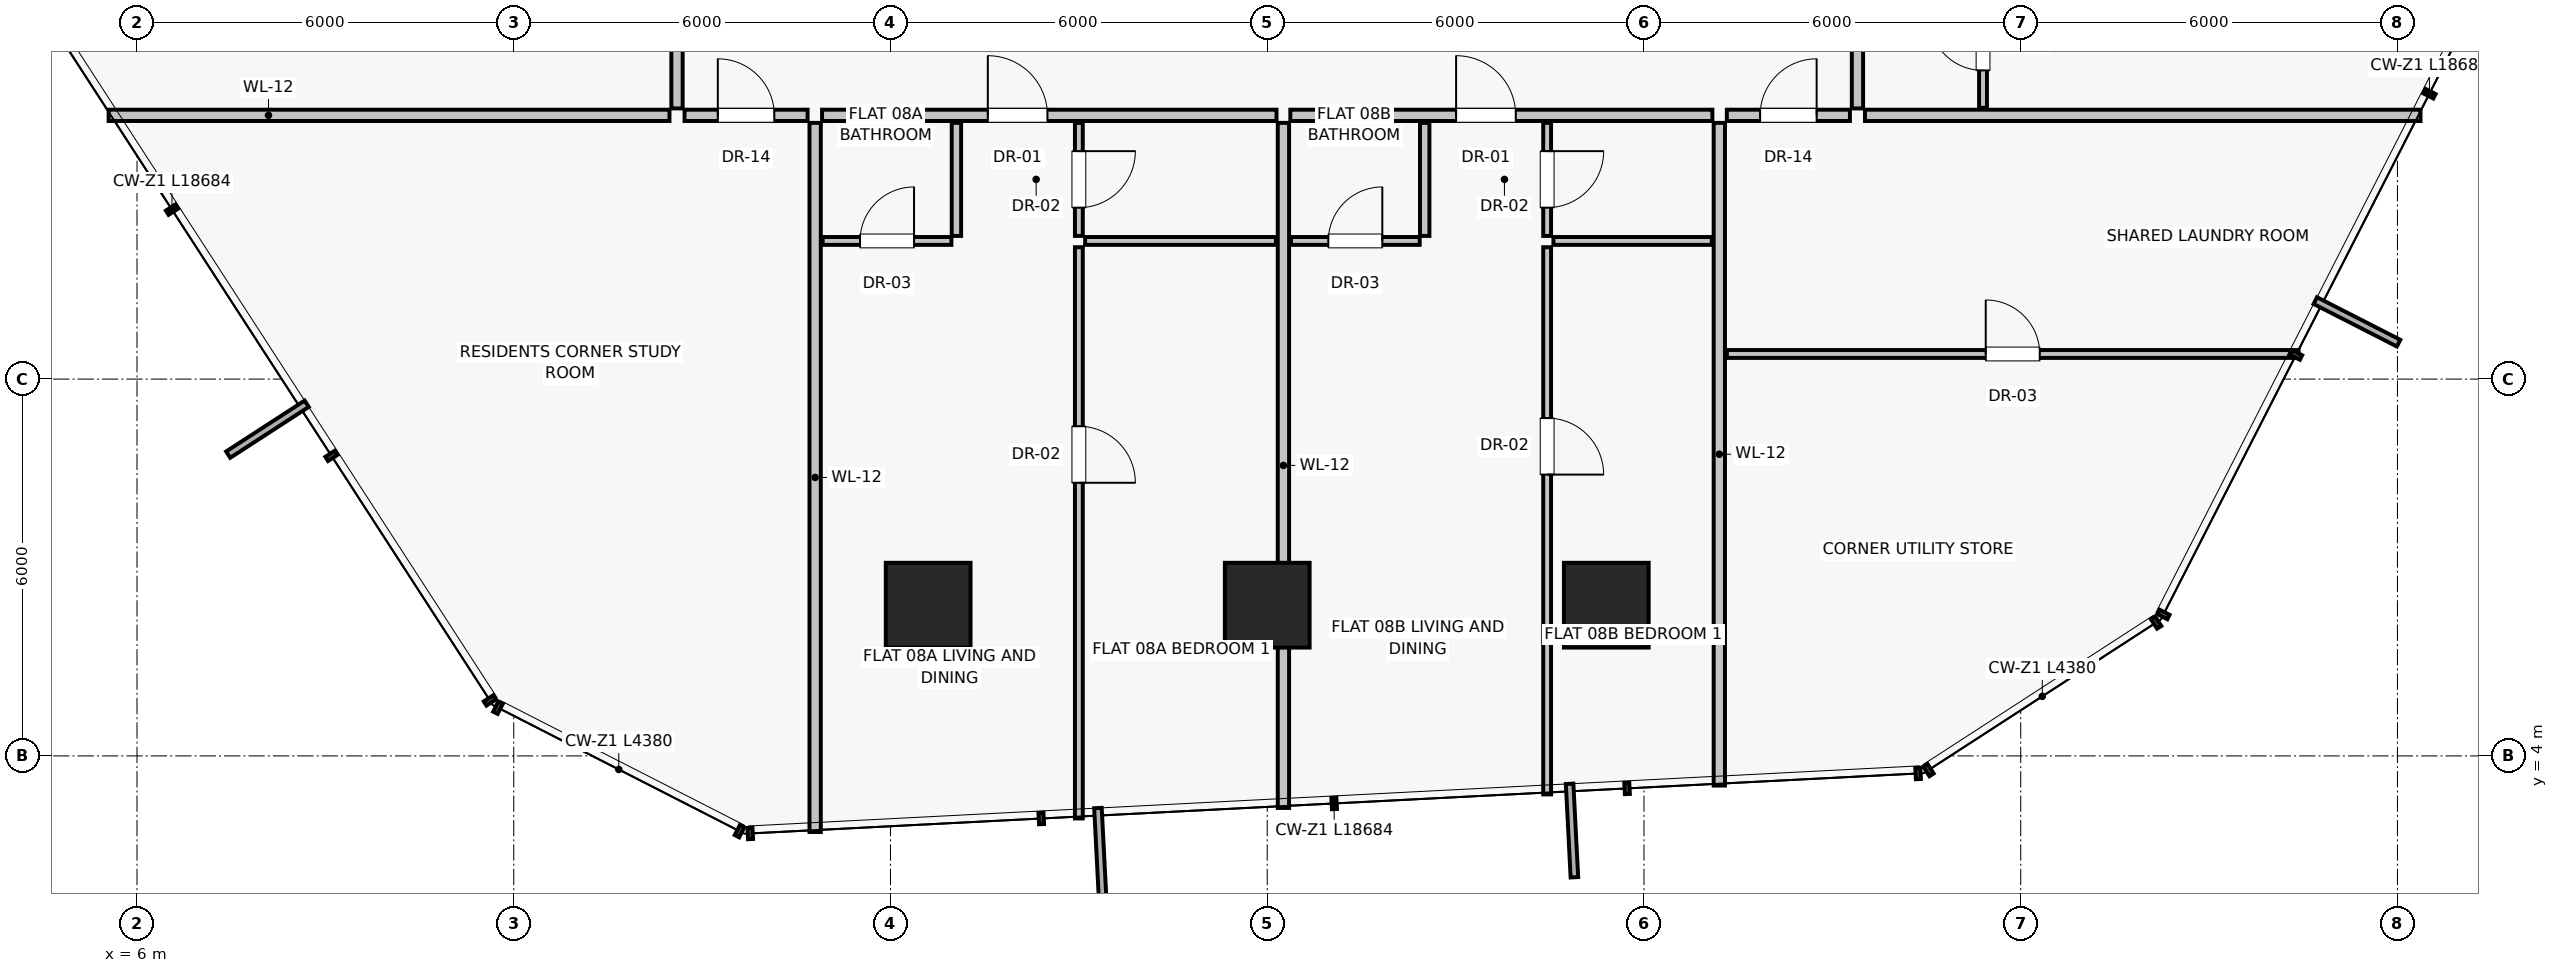
"""IFC4 building model, lengths in metres.
Left out: names, types, materials, properties, quantities, classifications, styles, units other than length and angle.
Written with IfcOpenShell. Run it as: python <this file> out.ifc"""

import sys

from ifc_helpers import new_model, si_unit, direction, frame, frame_2d, origin, origin_2d, place, context, subcontext, project, spatial, rectangle, extrude, source, transform, mapped, element, fill, save


model = new_model("IFC4")
c1 = context("Model", 3, precision=1e-05, world=origin(), true_north=direction((0.0, 1.0)))
c2 = subcontext(c1, "Body", "Model", "MODEL_VIEW")
j1 = project(units=[si_unit("LENGTHUNIT", "METRE"), si_unit("PLANEANGLEUNIT", "RADIAN")], contexts=[c1])
p1 = place(None, origin())
s1 = spatial("IfcSite", under=j1, at=p1, CompositionType="ELEMENT")
p2 = place(p1, origin())
s2 = spatial("IfcBuilding", under=s1, at=p2, CompositionType="ELEMENT")
p3 = place(p2, frame((0.0, 0.0, 33.8)))
s3 = spatial("IfcBuildingStorey", under=s2, at=p3, CompositionType="ELEMENT", Elevation=33.8)
for number, where, z_axis, x_axis in (
    (1, (18.6, 6.4, 0.0), (0.0, 0.0, 1.0), (1.0, 0.0, 0.0)),
    (2, (24.0, 6.4, 0.0), (0.0, 0.0, 1.0), (1.0, 0.0, 0.0)),
    (3, (29.4, 6.4, 0.0), (0.0, 0.0, 1.0), (1.0, 0.0, 0.0)),
):
    element("IfcColumn", number, at=place(p3, frame(where, z_axis=z_axis, x_axis=x_axis)), inside=s3, PredefinedType="COLUMN", context=c2, shape_type="SweptSolid", body=[
        extrude(rectangle(XDim=1.35, YDim=1.35, at=origin_2d()), origin(), (0.0, 0.0, 1.0), 3.25),
    ])
p4 = place(p3, frame((16.8, 14.08, 0.0), z_axis=(0.0, 0.0, 1.0), x_axis=(0.0, -1.0, 0.0)))
e4 = element("IfcWall", 4, at=p4, inside=s3, PredefinedType="PARTITIONING", context=c2, shape_type="SweptSolid", body=[
    extrude(rectangle(XDim=11.292, YDim=0.18, at=frame_2d((5.646, 0.0))), origin(), (0.0, 0.0, 1.0), 3.0),
])
p5 = place(p3, frame((31.2, 14.08, 0.0), z_axis=(0.0, 0.0, 1.0), x_axis=(0.0, -1.0, 0.0)))
e5 = element("IfcWall", 5, at=p5, inside=s3, PredefinedType="PARTITIONING", context=c2, shape_type="SweptSolid", body=[
    extrude(rectangle(XDim=10.552, YDim=0.18, at=frame_2d((5.276, 0.0))), origin(), (0.0, 0.0, 1.0), 3.0),
])
p6 = place(p3, frame((16.91, 14.2, 0.0), z_axis=(0.0, 0.0, 1.0), x_axis=(1.0, 0.0, 0.0)))
e6 = element("IfcWall", 6, at=p6, inside=s3, PredefinedType="PARTITIONING", context=c2, shape_type="SweptSolid", body=[
    extrude(rectangle(XDim=7.238, YDim=0.18, at=frame_2d((3.619, 0.0))), origin(), (0.0, 0.0, 1.0), 3.0),
])
p7 = place(p6, frame((2.64, 0.0, 0.0)))
e7 = element("IfcOpeningElement", 7, at=p7, cuts=e6, PredefinedType="OPENING", context=c2, shape_type="SweptSolid", body=[
    extrude(rectangle(XDim=0.95, YDim=2.02, at=frame_2d((0.475, 1.01))), frame((0.0, 0.1, 0.0), z_axis=(0.0, -1.0, 0.0), x_axis=(1.0, 0.0, 0.0)), (0.0, 0.0, 1.0), 0.2),
])
p8 = place(p3, frame((19.05, 14.08, 0.0), z_axis=(0.0, 0.0, 1.0), x_axis=(0.0, -1.0, 0.0)))
e8 = element("IfcWall", 8, at=p8, inside=s3, PredefinedType="PARTITIONING", context=c2, shape_type="SweptSolid", body=[
    extrude(rectangle(XDim=1.8, YDim=0.15, at=frame_2d((0.9, 0.0))), origin(), (0.0, 0.0, 1.0), 3.0),
])
p9 = place(p3, frame((16.92, 12.2, 0.0), z_axis=(0.0, 0.0, 1.0), x_axis=(1.0, 0.0, 0.0)))
e9 = element("IfcWall", 9, at=p9, inside=s3, PredefinedType="PARTITIONING", context=c2, shape_type="SweptSolid", body=[
    extrude(rectangle(XDim=2.05, YDim=0.125, at=frame_2d((1.025, 0.0))), origin(), (0.0, 0.0, 1.0), 3.0),
])
p10 = place(p9, frame((0.595, 0.0, 0.0)))
e10 = element("IfcOpeningElement", 10, at=p10, cuts=e9, PredefinedType="OPENING", context=c2, shape_type="SweptSolid", body=[
    extrude(rectangle(XDim=0.86, YDim=2.01, at=frame_2d((0.43, 1.005))), frame((0.0, 0.073, 0.0), z_axis=(0.0, -1.0, 0.0), x_axis=(1.0, 0.0, 0.0)), (0.0, 0.0, 1.0), 0.145),
])
p11 = place(p3, frame((21.0, 14.08, 0.0), z_axis=(0.0, 0.0, 1.0), x_axis=(0.0, -1.0, 0.0)))
e11 = element("IfcWall", 11, at=p11, inside=s3, PredefinedType="PARTITIONING", context=c2, shape_type="SweptSolid", body=[
    extrude(rectangle(XDim=1.8, YDim=0.125, at=frame_2d((0.9, 0.0))), origin(), (0.0, 0.0, 1.0), 3.0),
])
p12 = place(p11, frame((0.45, 0.0, 0.0)))
e12 = element("IfcOpeningElement", 12, at=p12, cuts=e11, PredefinedType="OPENING", context=c2, shape_type="SweptSolid", body=[
    extrude(rectangle(XDim=0.9, YDim=2.01, at=frame_2d((0.45, 1.005))), frame((0.0, 0.073, 0.0), z_axis=(0.0, -1.0, 0.0), x_axis=(1.0, 0.0, 0.0)), (0.0, 0.0, 1.0), 0.145),
])
p13 = place(p3, frame((21.1, 12.2, 0.0), z_axis=(0.0, 0.0, 1.0), x_axis=(1.0, 0.0, 0.0)))
e13 = element("IfcWall", 13, at=p13, inside=s3, PredefinedType="PARTITIONING", context=c2, shape_type="SweptSolid", body=[
    extrude(rectangle(XDim=3.038, YDim=0.125, at=frame_2d((1.519, 0.0))), origin(), (0.0, 0.0, 1.0), 3.0),
])
p14 = place(p3, frame((21.0, 12.1, 0.0), z_axis=(0.0, 0.0, 1.0), x_axis=(0.0, -1.0, 0.0)))
e14 = element("IfcWall", 14, at=p14, inside=s3, PredefinedType="PARTITIONING", context=c2, shape_type="SweptSolid", body=[
    extrude(rectangle(XDim=9.096, YDim=0.125, at=frame_2d((4.548, 0.0))), origin(), (0.0, 0.0, 1.0), 3.0),
])
p15 = place(p14, frame((2.851, 0.0, 0.0)))
e15 = element("IfcOpeningElement", 15, at=p15, cuts=e14, PredefinedType="OPENING", context=c2, shape_type="SweptSolid", body=[
    extrude(rectangle(XDim=0.9, YDim=2.01, at=frame_2d((0.45, 1.005))), frame((0.0, 0.073, 0.0), z_axis=(0.0, -1.0, 0.0), x_axis=(1.0, 0.0, 0.0)), (0.0, 0.0, 1.0), 0.145),
])
p16 = place(p3, frame((24.258, 14.08, 0.0), z_axis=(0.0, 0.0, 1.0), x_axis=(0.0, -1.0, 0.0)))
e16 = element("IfcWall", 16, at=p16, inside=s3, PredefinedType="PARTITIONING", context=c2, shape_type="SweptSolid", body=[
    extrude(rectangle(XDim=10.909, YDim=0.18, at=frame_2d((5.455, 0.0))), origin(), (0.0, 0.0, 1.0), 3.0),
])
p17 = place(p3, frame((24.368, 14.2, 0.0), z_axis=(0.0, 0.0, 1.0), x_axis=(1.0, 0.0, 0.0)))
e17 = element("IfcWall", 17, at=p17, inside=s3, PredefinedType="PARTITIONING", context=c2, shape_type="SweptSolid", body=[
    extrude(rectangle(XDim=6.722, YDim=0.18, at=frame_2d((3.361, 0.0))), origin(), (0.0, 0.0, 1.0), 3.0),
])
p18 = place(p17, frame((2.64, 0.0, 0.0)))
e18 = element("IfcOpeningElement", 18, at=p18, cuts=e17, PredefinedType="OPENING", context=c2, shape_type="SweptSolid", body=[
    extrude(rectangle(XDim=0.95, YDim=2.02, at=frame_2d((0.475, 1.01))), frame((0.0, 0.1, 0.0), z_axis=(0.0, -1.0, 0.0), x_axis=(1.0, 0.0, 0.0)), (0.0, 0.0, 1.0), 0.2),
])
p19 = place(p3, frame((26.508, 14.08, 0.0), z_axis=(0.0, 0.0, 1.0), x_axis=(0.0, -1.0, 0.0)))
e19 = element("IfcWall", 19, at=p19, inside=s3, PredefinedType="PARTITIONING", context=c2, shape_type="SweptSolid", body=[
    extrude(rectangle(XDim=1.8, YDim=0.15, at=frame_2d((0.9, 0.0))), origin(), (0.0, 0.0, 1.0), 3.0),
])
p20 = place(p3, frame((24.378, 12.2, 0.0), z_axis=(0.0, 0.0, 1.0), x_axis=(1.0, 0.0, 0.0)))
e20 = element("IfcWall", 20, at=p20, inside=s3, PredefinedType="PARTITIONING", context=c2, shape_type="SweptSolid", body=[
    extrude(rectangle(XDim=2.05, YDim=0.125, at=frame_2d((1.025, 0.0))), origin(), (0.0, 0.0, 1.0), 3.0),
])
p21 = place(p20, frame((0.595, 0.0, 0.0)))
e21 = element("IfcOpeningElement", 21, at=p21, cuts=e20, PredefinedType="OPENING", context=c2, shape_type="SweptSolid", body=[
    extrude(rectangle(XDim=0.86, YDim=2.01, at=frame_2d((0.43, 1.005))), frame((0.0, 0.073, 0.0), z_axis=(0.0, -1.0, 0.0), x_axis=(1.0, 0.0, 0.0)), (0.0, 0.0, 1.0), 0.145),
])
p22 = place(p3, frame((28.458, 14.08, 0.0), z_axis=(0.0, 0.0, 1.0), x_axis=(0.0, -1.0, 0.0)))
e22 = element("IfcWall", 22, at=p22, inside=s3, PredefinedType="PARTITIONING", context=c2, shape_type="SweptSolid", body=[
    extrude(rectangle(XDim=1.8, YDim=0.125, at=frame_2d((0.9, 0.0))), origin(), (0.0, 0.0, 1.0), 3.0),
])
p23 = place(p22, frame((0.45, 0.0, 0.0)))
e23 = element("IfcOpeningElement", 23, at=p23, cuts=e22, PredefinedType="OPENING", context=c2, shape_type="SweptSolid", body=[
    extrude(rectangle(XDim=0.9, YDim=2.01, at=frame_2d((0.45, 1.005))), frame((0.0, 0.073, 0.0), z_axis=(0.0, -1.0, 0.0), x_axis=(1.0, 0.0, 0.0)), (0.0, 0.0, 1.0), 0.145),
])
p24 = place(p3, frame((28.558, 12.2, 0.0), z_axis=(0.0, 0.0, 1.0), x_axis=(1.0, 0.0, 0.0)))
e24 = element("IfcWall", 24, at=p24, inside=s3, PredefinedType="PARTITIONING", context=c2, shape_type="SweptSolid", body=[
    extrude(rectangle(XDim=2.522, YDim=0.125, at=frame_2d((1.261, 0.0))), origin(), (0.0, 0.0, 1.0), 3.0),
])
p25 = place(p3, frame((28.458, 12.1, 0.0), z_axis=(0.0, 0.0, 1.0), x_axis=(0.0, -1.0, 0.0)))
e25 = element("IfcWall", 25, at=p25, inside=s3, PredefinedType="PARTITIONING", context=c2, shape_type="SweptSolid", body=[
    extrude(rectangle(XDim=8.713, YDim=0.125, at=frame_2d((4.356, 0.0))), origin(), (0.0, 0.0, 1.0), 3.0),
])
p26 = place(p25, frame((2.72, 0.0, 0.0)))
e26 = element("IfcOpeningElement", 26, at=p26, cuts=e25, PredefinedType="OPENING", context=c2, shape_type="SweptSolid", body=[
    extrude(rectangle(XDim=0.9, YDim=2.01, at=frame_2d((0.45, 1.005))), frame((0.0, 0.073, 0.0), z_axis=(0.0, -1.0, 0.0), x_axis=(1.0, 0.0, 0.0)), (0.0, 0.0, 1.0), 0.145),
])
p27 = place(p3, frame((14.48, 14.2, 0.0), z_axis=(0.0, 0.0, 1.0), x_axis=(-1.0, 0.0, 0.0)))
e27 = element("IfcWall", 27, at=p27, inside=s3, PredefinedType="PARTITIONING", context=c2, shape_type="SweptSolid", body=[
    extrude(rectangle(XDim=8.932, YDim=0.18, at=frame_2d((4.466, 0.0))), origin(), (0.0, 0.0, 1.0), 3.0),
])
p28 = place(p3, frame((14.6, 14.31, 0.0), z_axis=(0.0, 0.0, 1.0), x_axis=(0.0, 1.0, 0.0)))
e28 = element("IfcWall", 28, at=p28, inside=s3, PredefinedType="PARTITIONING", context=c2, shape_type="SweptSolid", body=[
    extrude(rectangle(XDim=3.697, YDim=0.18, at=frame_2d((1.849, 0.0))), origin(), (0.0, 0.0, 1.0), 3.0),
])
p29 = place(p28, frame((1.348, 0.0, 0.0)))
e29 = element("IfcOpeningElement", 29, at=p29, cuts=e28, PredefinedType="OPENING", context=c2, shape_type="SweptSolid", body=[
    extrude(rectangle(XDim=1.0, YDim=2.01, at=frame_2d((0.5, 1.005))), frame((0.0, 0.1, 0.0), z_axis=(0.0, -1.0, 0.0), x_axis=(1.0, 0.0, 0.0)), (0.0, 0.0, 1.0), 0.2),
])
p30 = place(p3, frame((33.52, 14.2, 0.0), z_axis=(0.0, 0.0, 1.0), x_axis=(1.0, 0.0, 0.0)))
e30 = element("IfcWall", 30, at=p30, inside=s3, PredefinedType="PARTITIONING", context=c2, shape_type="SweptSolid", body=[
    extrude(rectangle(XDim=8.847, YDim=0.18, at=frame_2d((4.423, 0.0))), origin(), (0.0, 0.0, 1.0), 3.0),
])
p31 = place(p3, frame((33.4, 14.31, 0.0), z_axis=(0.0, 0.0, 1.0), x_axis=(0.0, 1.0, 0.0)))
e31 = element("IfcWall", 31, at=p31, inside=s3, PredefinedType="PARTITIONING", context=c2, shape_type="SweptSolid", body=[
    extrude(rectangle(XDim=10.088, YDim=0.18, at=frame_2d((5.044, 0.0))), origin(), (0.0, 0.0, 1.0), 3.0),
])
p32 = place(p31, frame((3.426, 0.0, 0.0)))
e32 = element("IfcOpeningElement", 32, at=p32, cuts=e31, PredefinedType="OPENING", context=c2, shape_type="SweptSolid", body=[
    extrude(rectangle(XDim=0.95, YDim=2.02, at=frame_2d((0.475, 1.01))), frame((0.0, 0.1, 0.0), z_axis=(0.0, -1.0, 0.0), x_axis=(1.0, 0.0, 0.0)), (0.0, 0.0, 1.0), 0.2),
])
p33 = place(p3, frame((35.4, 14.32, 0.0), z_axis=(0.0, 0.0, 1.0), x_axis=(0.0, 1.0, 0.0)))
e33 = element("IfcWall", 33, at=p33, inside=s3, PredefinedType="PARTITIONING", context=c2, shape_type="SweptSolid", body=[
    extrude(rectangle(XDim=2.05, YDim=0.125, at=frame_2d((1.025, 0.0))), origin(), (0.0, 0.0, 1.0), 3.0),
])
p34 = place(p33, frame((0.595, 0.0, 0.0)))
e34 = element("IfcOpeningElement", 34, at=p34, cuts=e33, PredefinedType="OPENING", context=c2, shape_type="SweptSolid", body=[
    extrude(rectangle(XDim=0.86, YDim=2.01, at=frame_2d((0.43, 1.005))), frame((0.0, 0.073, 0.0), z_axis=(0.0, -1.0, 0.0), x_axis=(1.0, 0.0, 0.0)), (0.0, 0.0, 1.0), 0.145),
])
p35 = place(p3, frame((14.72, 14.2, 0.0), z_axis=(0.0, 0.0, 1.0), x_axis=(1.0, 0.0, 0.0)))
e35 = element("IfcWall", 35, at=p35, inside=s3, PredefinedType="PARTITIONING", context=c2, shape_type="SweptSolid", body=[
    extrude(rectangle(XDim=1.96, YDim=0.18, at=frame_2d((0.98, 0.0))), origin(), (0.0, 0.0, 1.0), 3.0),
])
p36 = place(p35, frame((0.53, 0.0, 0.0)))
e36 = element("IfcOpeningElement", 36, at=p36, cuts=e35, PredefinedType="OPENING", context=c2, shape_type="SweptSolid", body=[
    extrude(rectangle(XDim=0.9, YDim=2.01, at=frame_2d((0.45, 1.005))), frame((0.0, 0.1, 0.0), z_axis=(0.0, -1.0, 0.0), x_axis=(1.0, 0.0, 0.0)), (0.0, 0.0, 1.0), 0.2),
])
p37 = place(p3, frame((31.32, 14.2, 0.0), z_axis=(0.0, 0.0, 1.0), x_axis=(1.0, 0.0, 0.0)))
e37 = element("IfcWall", 37, at=p37, inside=s3, PredefinedType="PARTITIONING", context=c2, shape_type="SweptSolid", body=[
    extrude(rectangle(XDim=1.96, YDim=0.18, at=frame_2d((0.98, 0.0))), origin(), (0.0, 0.0, 1.0), 3.0),
])
p38 = place(p37, frame((0.53, 0.0, 0.0)))
e38 = element("IfcOpeningElement", 38, at=p38, cuts=e37, PredefinedType="OPENING", context=c2, shape_type="SweptSolid", body=[
    extrude(rectangle(XDim=0.9, YDim=2.01, at=frame_2d((0.45, 1.005))), frame((0.0, 0.1, 0.0), z_axis=(0.0, -1.0, 0.0), x_axis=(1.0, 0.0, 0.0)), (0.0, 0.0, 1.0), 0.2),
])
p39 = place(p3, frame((31.32, 10.4, 0.0), z_axis=(0.0, 0.0, 1.0), x_axis=(1.0, 0.0, 0.0)))
e39 = element("IfcWall", 39, at=p39, inside=s3, PredefinedType="PARTITIONING", context=c2, shape_type="SweptSolid", body=[
    extrude(rectangle(XDim=9.106, YDim=0.125, at=frame_2d((4.553, 0.0))), origin(), (0.0, 0.0, 1.0), 3.0),
])
p40 = place(p39, frame((4.123, 0.0, 0.0)))
e40 = element("IfcOpeningElement", 40, at=p40, cuts=e39, PredefinedType="OPENING", context=c2, shape_type="SweptSolid", body=[
    extrude(rectangle(XDim=0.86, YDim=2.01, at=frame_2d((0.43, 1.005))), frame((0.0, 0.073, 0.0), z_axis=(0.0, -1.0, 0.0), x_axis=(1.0, 0.0, 0.0)), (0.0, 0.0, 1.0), 0.145),
])
m1 = source(origin(), c2, "Body", "SweptSolid", [
    extrude(rectangle(XDim=0.95, YDim=2.02, at=frame_2d((0.475, 1.01))), frame((0.0, 0.025, 0.0), z_axis=(0.0, -1.0, 0.0), x_axis=(1.0, 0.0, 0.0)), (0.0, 0.0, 1.0), 0.05),
])
p41 = place(p7, origin())
e41 = element("IfcDoor", 41, at=p41, inside=s3, OperationType="SINGLE_SWING_LEFT", PredefinedType="DOOR", context=c2, shape_type="MappedRepresentation", body=[
    mapped(m1, transform((0.0, 0.0, 0.0), scale=1.0)),
])
fill(e7, e41)
m2 = source(origin(), c2, "Body", "SweptSolid", [
    extrude(rectangle(XDim=0.86, YDim=2.01, at=frame_2d((0.43, 1.005))), frame((0.0, 0.025, 0.0), z_axis=(0.0, -1.0, 0.0), x_axis=(1.0, 0.0, 0.0)), (0.0, 0.0, 1.0), 0.05),
])
p42 = place(p10, origin())
e42 = element("IfcDoor", 42, at=p42, inside=s3, OperationType="SINGLE_SWING_RIGHT", PredefinedType="DOOR", context=c2, shape_type="MappedRepresentation", body=[
    mapped(m2, transform((0.0, 0.0, 0.0), scale=1.0)),
])
fill(e10, e42)
m3 = source(origin(), c2, "Body", "SweptSolid", [
    extrude(rectangle(XDim=0.9, YDim=2.01, at=frame_2d((0.45, 1.005))), frame((0.0, 0.025, 0.0), z_axis=(0.0, -1.0, 0.0), x_axis=(1.0, 0.0, 0.0)), (0.0, 0.0, 1.0), 0.05),
])
p43 = place(p12, origin())
e43 = element("IfcDoor", 43, at=p43, inside=s3, OperationType="SINGLE_SWING_LEFT", PredefinedType="DOOR", context=c2, shape_type="MappedRepresentation", body=[
    mapped(m3, transform((0.0, 0.0, 0.0), scale=1.0)),
])
fill(e12, e43)
p44 = place(p15, origin())
e44 = element("IfcDoor", 44, at=p44, inside=s3, OperationType="SINGLE_SWING_RIGHT", PredefinedType="DOOR", context=c2, shape_type="MappedRepresentation", body=[
    mapped(m3, transform((0.0, 0.0, 0.0), scale=1.0)),
])
fill(e15, e44)
p45 = place(p18, origin())
e45 = element("IfcDoor", 45, at=p45, inside=s3, OperationType="SINGLE_SWING_LEFT", PredefinedType="DOOR", context=c2, shape_type="MappedRepresentation", body=[
    mapped(m1, transform((0.0, 0.0, 0.0), scale=1.0)),
])
fill(e18, e45)
p46 = place(p21, origin())
e46 = element("IfcDoor", 46, at=p46, inside=s3, OperationType="SINGLE_SWING_RIGHT", PredefinedType="DOOR", context=c2, shape_type="MappedRepresentation", body=[
    mapped(m2, transform((0.0, 0.0, 0.0), scale=1.0)),
])
fill(e21, e46)
p47 = place(p23, origin())
e47 = element("IfcDoor", 47, at=p47, inside=s3, OperationType="SINGLE_SWING_LEFT", PredefinedType="DOOR", context=c2, shape_type="MappedRepresentation", body=[
    mapped(m3, transform((0.0, 0.0, 0.0), scale=1.0)),
])
fill(e23, e47)
p48 = place(p26, origin())
e48 = element("IfcDoor", 48, at=p48, inside=s3, OperationType="SINGLE_SWING_RIGHT", PredefinedType="DOOR", context=c2, shape_type="MappedRepresentation", body=[
    mapped(m3, transform((0.0, 0.0, 0.0), scale=1.0)),
])
fill(e26, e48)
p49 = place(p34, origin())
e49 = element("IfcDoor", 49, at=p49, inside=s3, OperationType="SINGLE_SWING_RIGHT", PredefinedType="DOOR", context=c2, shape_type="MappedRepresentation", body=[
    mapped(m2, transform((0.0, 0.0, 0.0), scale=1.0)),
])
fill(e34, e49)
p50 = place(p36, origin())
e50 = element("IfcDoor", 50, at=p50, inside=s3, OperationType="SINGLE_SWING_LEFT", PredefinedType="DOOR", context=c2, shape_type="MappedRepresentation", body=[
    mapped(m3, transform((0.0, 0.0, 0.0), scale=1.0)),
])
fill(e36, e50)
p51 = place(p38, origin())
e51 = element("IfcDoor", 51, at=p51, inside=s3, OperationType="SINGLE_SWING_RIGHT", PredefinedType="DOOR", context=c2, shape_type="MappedRepresentation", body=[
    mapped(m3, transform((0.0, 0.0, 0.0), scale=1.0)),
])
fill(e38, e51)
p52 = place(p40, origin())
e52 = element("IfcDoor", 52, at=p52, inside=s3, OperationType="SINGLE_SWING_LEFT", PredefinedType="DOOR", context=c2, shape_type="MappedRepresentation", body=[
    mapped(m2, transform((0.0, 0.0, 0.0), scale=1.0)),
])
fill(e40, e52)
save(model, sys.argv[1])
